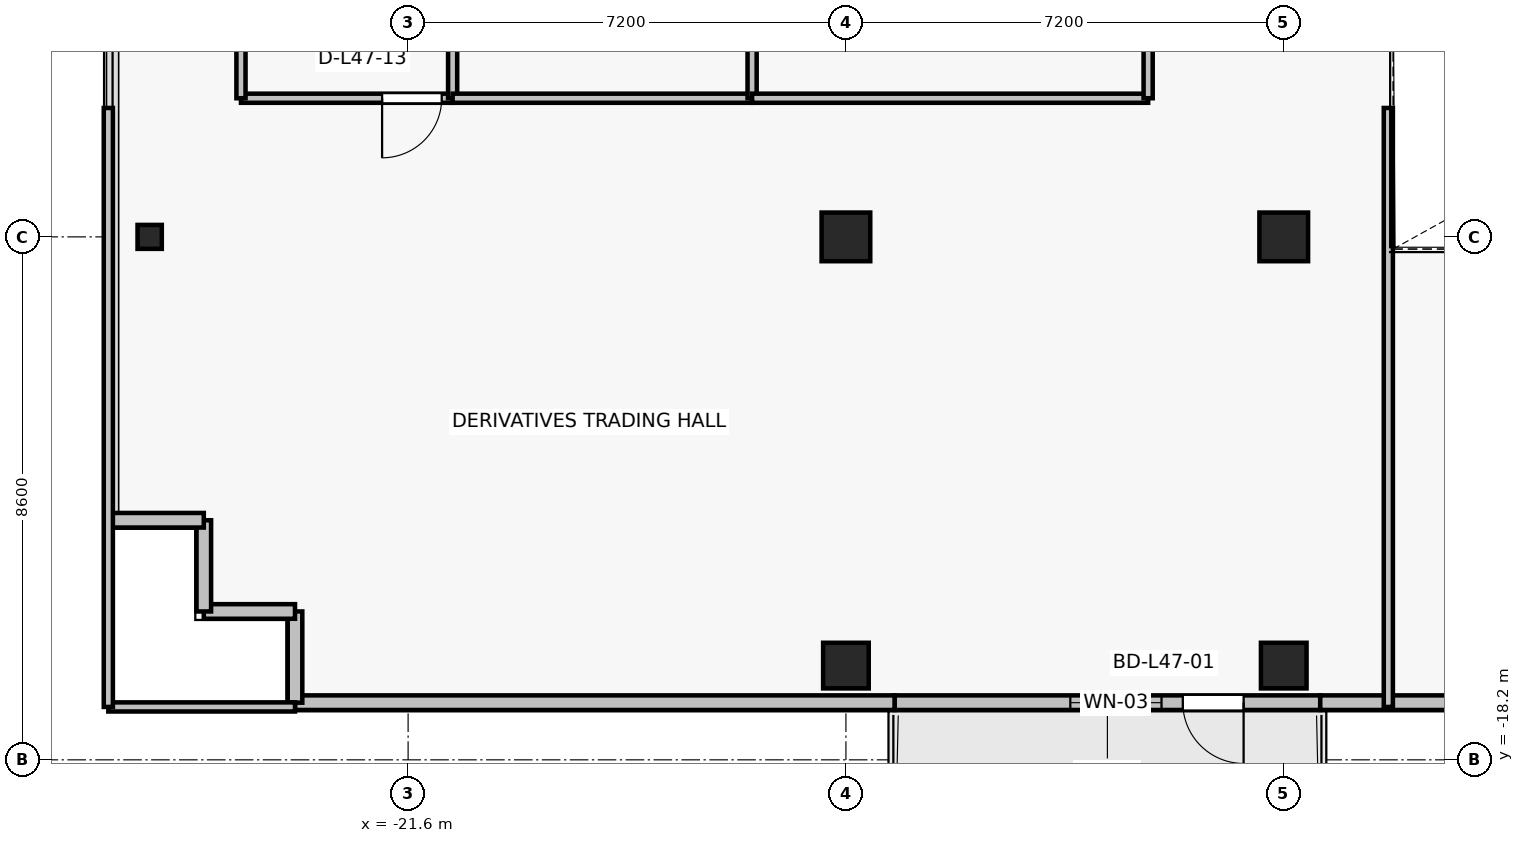
"""IFC4 building model, lengths in metres.
Left out: names, types, materials, properties, quantities, classifications, styles, units other than length and angle.
Written with IfcOpenShell. Run it as: python <this file> out.ifc"""

import sys

from ifc_helpers import new_model, si_unit, direction, frame, frame_2d, origin, origin_2d, place, context, subcontext, project, spatial, rectangle, i_section, extrude, source, transform, mapped, element, fill, save


model = new_model("IFC4")
c1 = context("Model", 3, precision=1e-05, world=origin(), true_north=direction((0.0, 1.0)))
c2 = subcontext(c1, "Body", "Model", "MODEL_VIEW")
j1 = project(units=[si_unit("LENGTHUNIT", "METRE"), si_unit("PLANEANGLEUNIT", "RADIAN")], contexts=[c1])
p1 = place(None, origin())
s1 = spatial("IfcSite", under=j1, at=p1, CompositionType="ELEMENT")
p2 = place(p1, origin())
s2 = spatial("IfcBuilding", under=s1, at=p2, CompositionType="ELEMENT")
p3 = place(p2, frame((0.0, 0.0, 169.3)))
s3 = spatial("IfcBuildingStorey", under=s2, at=p3, CompositionType="ELEMENT", Elevation=169.3)
for number, where, z_axis, x_axis in (
    (1, (-14.4, -9.6, 0.0), (0.0, 0.0, 1.0), (1.0, 0.0, 0.0)),
    (2, (-7.2, -9.6, 0.0), (0.0, 0.0, 1.0), (1.0, 0.0, 0.0)),
):
    element("IfcColumn", number, at=place(p3, frame(where, z_axis=z_axis, x_axis=x_axis)), inside=s3, PredefinedType="COLUMN", context=c2, shape_type="SweptSolid", body=[
        extrude(rectangle(XDim=0.8, YDim=0.8, at=origin_2d()), origin(), (0.0, 0.0, 1.0), 3.3),
    ])
for number, where, z_axis, x_axis in (
    (3, (-14.4, -16.65, 0.0), (0.0, 0.0, 1.0), (1.0, 0.0, 0.0)),
    (4, (-7.2, -16.65, 0.0), (0.0, 0.0, 1.0), (1.0, 0.0, 0.0)),
):
    element("IfcColumn", number, at=place(p3, frame(where, z_axis=z_axis, x_axis=x_axis)), inside=s3, PredefinedType="COLUMN", context=c2, shape_type="SweptSolid", body=[
        extrude(rectangle(XDim=0.75, YDim=0.75, at=origin_2d()), origin(), (0.0, 0.0, 1.0), 3.3),
    ])
p4 = place(p3, frame((-25.85, -9.6, 0.0), z_axis=(0.0, 0.0, 1.0), x_axis=(1.0, 0.0, 0.0)))
e5 = element("IfcColumn", 5, at=p4, inside=s3, PredefinedType="COLUMN", context=c2, shape_type="SweptSolid", body=[
    extrude(i_section(OverallWidth=0.399, OverallDepth=0.394, WebThickness=0.023, FlangeThickness=0.037, FilletRadius=0.015, at=origin_2d()), origin(), (0.0, 0.0, 1.0), 3.3),
])
p5 = place(p3, frame((-6.6, -17.26, 0.0), z_axis=(0.0, 0.0, 1.0), x_axis=(-1.0, 0.0, 0.0)))
e6 = element("IfcWall", 6, at=p5, inside=s3, PredefinedType="SOLIDWALL", context=c2, shape_type="SweptSolid", body=[
    extrude(rectangle(XDim=7.0, YDim=0.24, at=frame_2d((3.5, 0.0))), origin(), (0.0, 0.0, 1.0), 2.665),
])
p6 = place(p5, frame((1.26, 0.0, 0.0)))
e7 = element("IfcOpeningElement", 7, at=p6, cuts=e6, PredefinedType="OPENING", context=c2, shape_type="SweptSolid", body=[
    extrude(rectangle(XDim=1.0, YDim=2.2, at=frame_2d((0.5, 1.1))), frame((0.0, 0.13, 0.0), z_axis=(0.0, -1.0, 0.0), x_axis=(1.0, 0.0, 0.0)), (0.0, 0.0, 1.0), 0.26),
])
p7 = place(p5, frame((2.61, 0.0, 0.85)))
e8 = element("IfcOpeningElement", 8, at=p7, cuts=e6, PredefinedType="OPENING", context=c2, shape_type="SweptSolid", body=[
    extrude(rectangle(XDim=1.5, YDim=1.6, at=frame_2d((0.75, 0.8))), frame((0.0, 0.13, 0.0), z_axis=(0.0, -1.0, 0.0), x_axis=(1.0, 0.0, 0.0)), (0.0, 0.0, 1.0), 0.26),
])
p8 = place(p3, frame((-6.6, -17.26, 0.0), z_axis=(0.0, 0.0, 1.0), x_axis=(1.0, 0.0, 0.0)))
e9 = element("IfcWall", 9, at=p8, inside=s3, PredefinedType="SOLIDWALL", context=c2, shape_type="SweptSolid", body=[
    extrude(rectangle(XDim=3.4, YDim=0.24, at=frame_2d((1.7, 0.0))), origin(), (0.0, 0.0, 1.0), 3.075),
])
p9 = place(p3, frame((-23.46, -17.26, 0.0), z_axis=(0.0, 0.0, 1.0), x_axis=(1.0, 0.0, 0.0)))
e10 = element("IfcWall", 10, at=p9, inside=s3, PredefinedType="SOLIDWALL", context=c2, shape_type="SweptSolid", body=[
    extrude(rectangle(XDim=9.86, YDim=0.24, at=frame_2d((4.93, 0.0))), origin(), (0.0, 0.0, 1.0), 2.665),
])
for number, where, z_axis, x_axis in (
    (11, (-23.46, -15.76, 0.0), (0.0, 0.0, 1.0), (0.0, -1.0, 0.0)),
    (12, (-24.96, -15.76, 0.0), (0.0, 0.0, 1.0), (1.0, 0.0, 0.0)),
    (13, (-24.96, -14.26, 0.0), (0.0, 0.0, 1.0), (0.0, -1.0, 0.0)),
    (14, (-26.46, -14.26, 0.0), (0.0, 0.0, 1.0), (1.0, 0.0, 0.0)),
):
    element("IfcWall", number, at=place(p3, frame(where, z_axis=z_axis, x_axis=x_axis)), inside=s3, PredefinedType="SOLIDWALL", context=c2, shape_type="SweptSolid", body=[
        extrude(rectangle(XDim=1.5, YDim=0.24, at=frame_2d((0.75, 0.0))), origin(), (0.0, 0.0, 1.0), 3.075),
    ])
p10 = place(p3, frame((-20.868, -7.32, 0.0), z_axis=(0.0, 0.0, 1.0), x_axis=(-1.0, 0.0, 0.0)))
e15 = element("IfcWall", 15, at=p10, inside=s3, PredefinedType="PARTITIONING", context=c2, shape_type="SweptSolid", body=[
    extrude(rectangle(XDim=3.481, YDim=0.15, at=frame_2d((1.74, 0.0))), origin(), (0.0, 0.0, 1.0), 2.565),
])
p11 = place(p10, frame((0.18, 0.0, 0.0)))
e16 = element("IfcOpeningElement", 16, at=p11, cuts=e15, PredefinedType="OPENING", context=c2, shape_type="SweptSolid", body=[
    extrude(rectangle(XDim=0.98, YDim=2.15, at=frame_2d((0.49, 1.075))), frame((0.0, 0.085, 0.0), z_axis=(0.0, -1.0, 0.0), x_axis=(1.0, 0.0, 0.0)), (0.0, 0.0, 1.0), 0.17),
])
p12 = place(p3, frame((-24.349, -7.32, 0.0), z_axis=(0.0, 0.0, 1.0), x_axis=(0.0, 1.0, 0.0)))
e17 = element("IfcWall", 17, at=p12, inside=s3, PredefinedType="PARTITIONING", context=c2, shape_type="SweptSolid", body=[
    extrude(rectangle(XDim=3.49, YDim=0.15, at=frame_2d((1.745, 0.0))), origin(), (0.0, 0.0, 1.0), 3.075),
])
p13 = place(p3, frame((-20.868, -3.83, 0.0), z_axis=(0.0, 0.0, 1.0), x_axis=(0.0, -1.0, 0.0)))
e18 = element("IfcWall", 18, at=p13, inside=s3, PredefinedType="PARTITIONING", context=c2, shape_type="SweptSolid", body=[
    extrude(rectangle(XDim=3.49, YDim=0.15, at=frame_2d((1.745, 0.0))), origin(), (0.0, 0.0, 1.0), 2.665),
])
p14 = place(p3, frame((-15.943, -7.32, 0.0), z_axis=(0.0, 0.0, 1.0), x_axis=(-1.0, 0.0, 0.0)))
e19 = element("IfcWall", 19, at=p14, inside=s3, PredefinedType="PARTITIONING", context=c2, shape_type="SweptSolid", body=[
    extrude(rectangle(XDim=4.925, YDim=0.15, at=frame_2d((2.462, 0.0))), origin(), (0.0, 0.0, 1.0), 3.075),
])
p15 = place(p3, frame((-15.943, -3.83, 0.0), z_axis=(0.0, 0.0, 1.0), x_axis=(0.0, -1.0, 0.0)))
e20 = element("IfcWall", 20, at=p15, inside=s3, PredefinedType="PARTITIONING", context=c2, shape_type="SweptSolid", body=[
    extrude(rectangle(XDim=3.49, YDim=0.15, at=frame_2d((1.745, 0.0))), origin(), (0.0, 0.0, 1.0), 2.665),
])
p16 = place(p3, frame((-9.43, -7.32, 0.0), z_axis=(0.0, 0.0, 1.0), x_axis=(-1.0, 0.0, 0.0)))
e21 = element("IfcWall", 21, at=p16, inside=s3, PredefinedType="PARTITIONING", context=c2, shape_type="SweptSolid", body=[
    extrude(rectangle(XDim=6.513, YDim=0.15, at=frame_2d((3.257, 0.0))), origin(), (0.0, 0.0, 1.0), 2.565),
])
p17 = place(p3, frame((-9.43, -3.83, 0.0), z_axis=(0.0, 0.0, 1.0), x_axis=(0.0, -1.0, 0.0)))
e22 = element("IfcWall", 22, at=p17, inside=s3, PredefinedType="PARTITIONING", context=c2, shape_type="SweptSolid", body=[
    extrude(rectangle(XDim=3.49, YDim=0.15, at=frame_2d((1.745, 0.0))), origin(), (0.0, 0.0, 1.0), 2.665),
])
p18 = place(p3, frame((-23.46, -17.33, 0.0), z_axis=(0.0, 0.0, 1.0), x_axis=(-1.0, 0.0, 0.0)))
e23 = element("IfcWall", 23, at=p18, inside=s3, PredefinedType="PARTITIONING", context=c2, shape_type="SweptSolid", body=[
    extrude(rectangle(XDim=3.07, YDim=0.15, at=frame_2d((1.535, 0.0))), origin(), (0.0, 0.0, 1.0), 2.665),
])
p19 = place(p3, frame((-26.53, -17.33, 0.0), z_axis=(0.0, 0.0, 1.0), x_axis=(0.0, 1.0, 0.0)))
e24 = element("IfcWall", 24, at=p19, inside=s3, PredefinedType="PARTITIONING", context=c2, shape_type="SweptSolid", body=[
    extrude(rectangle(XDim=9.85, YDim=0.15, at=frame_2d((4.925, 0.0))), origin(), (0.0, 0.0, 1.0), 3.075),
])
p20 = place(p3, frame((-5.48, -7.48, 0.0), z_axis=(0.0, 0.0, 1.0), x_axis=(0.0, -1.0, 0.0)))
e25 = element("IfcWall", 25, at=p20, inside=s3, PredefinedType="PARTITIONING", context=c2, shape_type="SweptSolid", body=[
    extrude(rectangle(XDim=9.85, YDim=0.15, at=frame_2d((4.925, 0.0))), origin(), (0.0, 0.0, 1.0), 2.565),
])
m1 = source(origin(), c2, "Body", "SweptSolid", [
    extrude(rectangle(XDim=1.0, YDim=2.2, at=frame_2d((0.5, 1.1))), frame((0.0, 0.025, 0.0), z_axis=(0.0, -1.0, 0.0), x_axis=(1.0, 0.0, 0.0)), (0.0, 0.0, 1.0), 0.05),
])
p21 = place(p6, origin())
e26 = element("IfcDoor", 26, at=p21, inside=s3, OperationType="SINGLE_SWING_LEFT", PredefinedType="DOOR", context=c2, shape_type="MappedRepresentation", body=[
    mapped(m1, transform((0.0, 0.0, 0.0), x_axis=(1.0, 0.0, 0.0), y_axis=(0.0, 1.0, 0.0), z_axis=(0.0, 0.0, 1.0), scale=1.0)),
])
fill(e7, e26)
m2 = source(origin(), c2, "Body", "SweptSolid", [
    extrude(rectangle(XDim=1.5, YDim=1.6, at=frame_2d((0.75, 0.8))), frame((0.0, 0.03, 0.0), z_axis=(0.0, -1.0, 0.0), x_axis=(1.0, 0.0, 0.0)), (0.0, 0.0, 1.0), 0.06),
])
p22 = place(p7, origin())
e27 = element("IfcWindow", 27, at=p22, inside=s3, PartitioningType="SINGLE_PANEL", PredefinedType="WINDOW", context=c2, shape_type="MappedRepresentation", body=[
    mapped(m2, transform((0.0, 0.0, 0.0), x_axis=(1.0, 0.0, 0.0), y_axis=(0.0, 1.0, 0.0), z_axis=(0.0, 0.0, 1.0), scale=1.0)),
])
fill(e8, e27)
m3 = source(origin(), c2, "Body", "SweptSolid", [
    extrude(rectangle(XDim=0.98, YDim=2.15, at=frame_2d((0.49, 1.075))), frame((0.0, 0.025, 0.0), z_axis=(0.0, -1.0, 0.0), x_axis=(1.0, 0.0, 0.0)), (0.0, 0.0, 1.0), 0.05),
])
p23 = place(p11, origin())
e28 = element("IfcDoor", 28, at=p23, inside=s3, OperationType="SINGLE_SWING_RIGHT", PredefinedType="DOOR", context=c2, shape_type="MappedRepresentation", body=[
    mapped(m3, transform((0.0, 0.0, 0.0), x_axis=(1.0, 0.0, 0.0), y_axis=(0.0, 1.0, 0.0), z_axis=(0.0, 0.0, 1.0), scale=1.0)),
])
fill(e16, e28)
save(model, sys.argv[1])
